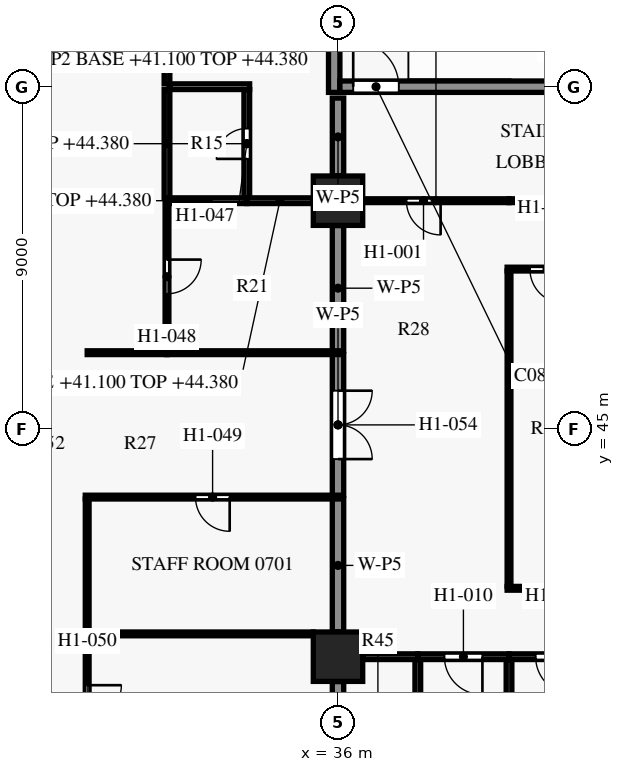
"""IFC4 building model, lengths in metres.
Left out: names, types, materials, properties, quantities, classifications, styles, units other than length and angle.
Written with IfcOpenShell. Run it as: python <this file> out.ifc"""

import sys

from ifc_helpers import new_model, si_unit, direction, frame, frame_2d, origin, origin_2d, place, context, subcontext, project, spatial, rectangle, extrude, element, fill, save


model = new_model("IFC4")
c1 = context("Model", 3, precision=1e-05, world=origin(), true_north=direction((0.0, 1.0)))
c2 = subcontext(c1, "Body", "Model", "MODEL_VIEW")
j1 = project(units=[si_unit("LENGTHUNIT", "METRE"), si_unit("PLANEANGLEUNIT", "RADIAN")], contexts=[c1])
p1 = place(None, origin())
s1 = spatial("IfcSite", under=j1, at=p1, CompositionType="ELEMENT")
p2 = place(p1, origin())
s2 = spatial("IfcBuilding", under=s1, at=p2, CompositionType="ELEMENT")
p3 = place(p2, frame((0.0, 0.0, 41.1)))
s3 = spatial("IfcBuildingStorey", under=s2, at=p3, CompositionType="ELEMENT", Elevation=41.1)
for number, where, z_axis, x_axis in (
    (1, (36.0, 39.0, 0.0), (0.0, 0.0, 1.0), (1.0, 0.0, 0.0)),
    (2, (36.0, 51.0, 0.0), (0.0, 0.0, 1.0), (1.0, 0.0, 0.0)),
):
    element("IfcColumn", number, at=place(p3, frame(where, z_axis=z_axis, x_axis=x_axis)), inside=s3, PredefinedType="COLUMN", context=c2, shape_type="SweptSolid", body=[
        extrude(rectangle(XDim=1.3, YDim=1.3, at=origin_2d()), origin(), (0.0, 0.0, 1.0), 3.6),
    ])
p4 = place(p3, frame((36.05, 54.0, 0.0), z_axis=(0.0, 0.0, 1.0), x_axis=(1.0, 0.0, 0.0)))
e3 = element("IfcWall", 3, at=p4, inside=s3, PredefinedType="SHEAR", context=c2, shape_type="SweptSolid", body=[
    extrude(rectangle(XDim=7.7, YDim=0.3, at=frame_2d((3.85, 0.0))), origin(), (0.0, 0.0, 1.0), 3.3),
])
p5 = place(p4, frame((0.35, 0.0, 0.0)))
e4 = element("IfcOpeningElement", 4, at=p5, cuts=e3, PredefinedType="OPENING", context=c2, shape_type="SweptSolid", body=[
    extrude(rectangle(XDim=1.2, YDim=2.2, at=frame_2d((0.6, 1.1))), frame((0.0, 0.16, 0.0), z_axis=(0.0, -1.0, 0.0), x_axis=(1.0, 0.0, 0.0)), (0.0, 0.0, 1.0), 0.32),
])
p6 = place(p3, frame((35.9, 53.85, 0.0), z_axis=(0.0, 0.0, 1.0), x_axis=(0.0, 1.0, 0.0)))
e5 = element("IfcWall", 5, at=p6, inside=s3, PredefinedType="SHEAR", context=c2, shape_type="SweptSolid", body=[
    extrude(rectangle(XDim=3.9, YDim=0.3, at=frame_2d((1.95, 0.0))), origin(), (0.0, 0.0, 1.0), 3.3),
])
p7 = place(p3, frame((38.1, 36.075, 0.0), z_axis=(0.0, 0.0, 1.0), x_axis=(0.0, 1.0, 0.0)))
e6 = element("IfcWall", 6, at=p7, inside=s3, PredefinedType="PARTITIONING", context=c2, shape_type="SweptSolid", body=[
    extrude(rectangle(XDim=2.85, YDim=0.15, at=frame_2d((1.425, 0.0))), origin(), (0.0, 0.0, 1.0), 2.58),
])
p8 = place(p7, frame((1.025, 0.0, 0.0)))
e7 = element("IfcOpeningElement", 7, at=p8, cuts=e6, PredefinedType="OPENING", context=c2, shape_type="SweptSolid", body=[
    extrude(rectangle(XDim=0.8, YDim=2.1, at=frame_2d((0.4, 1.05))), frame((0.0, 0.085, 0.0), z_axis=(0.0, -1.0, 0.0), x_axis=(1.0, 0.0, 0.0)), (0.0, 0.0, 1.0), 0.17),
])
p9 = place(p3, frame((36.0, 38.345, 0.0), z_axis=(0.0, 0.0, 1.0), x_axis=(0.0, -1.0, 0.0)))
e8 = element("IfcWall", 8, at=p9, inside=s3, PredefinedType="PARTITIONING", context=c2, shape_type="SweptSolid", body=[
    extrude(rectangle(XDim=2.27, YDim=0.3, at=frame_2d((1.135, 0.0))), origin(), (0.0, 0.0, 1.0), 2.58),
])
p10 = place(p3, frame((40.5, 38.925, 0.0), z_axis=(0.0, 0.0, 1.0), x_axis=(0.0, -1.0, 0.0)))
e9 = element("IfcWall", 9, at=p10, inside=s3, PredefinedType="PARTITIONING", context=c2, shape_type="SweptSolid", body=[
    extrude(rectangle(XDim=11.35, YDim=0.15, at=frame_2d((5.675, 0.0))), origin(), (0.0, 0.0, 1.0), 2.58),
])
p11 = place(p3, frame((38.1, 39.0, 0.0), z_axis=(0.0, 0.0, 1.0), x_axis=(-1.0, 0.0, 0.0)))
e10 = element("IfcWall", 10, at=p11, inside=s3, PredefinedType="PARTITIONING", context=c2, shape_type="SweptSolid", body=[
    extrude(rectangle(XDim=1.445, YDim=0.15, at=frame_2d((0.723, 0.0))), origin(), (0.0, 0.0, 1.0), 2.58),
])
p12 = place(p3, frame((40.5, 39.0, 0.0), z_axis=(0.0, 0.0, 1.0), x_axis=(-1.0, 0.0, 0.0)))
e11 = element("IfcWall", 11, at=p12, inside=s3, PredefinedType="PARTITIONING", context=c2, shape_type="SweptSolid", body=[
    extrude(rectangle(XDim=2.4, YDim=0.15, at=frame_2d((1.2, 0.0))), origin(), (0.0, 0.0, 1.0), 2.58),
])
p13 = place(p12, frame((0.7, 0.0, 0.0)))
e12 = element("IfcOpeningElement", 12, at=p13, cuts=e11, PredefinedType="OPENING", context=c2, shape_type="SweptSolid", body=[
    extrude(rectangle(XDim=1.0, YDim=2.1, at=frame_2d((0.5, 1.05))), frame((0.0, 0.085, 0.0), z_axis=(0.0, -1.0, 0.0), x_axis=(1.0, 0.0, 0.0)), (0.0, 0.0, 1.0), 0.17),
])
p14 = place(p3, frame((42.9, 39.0, 0.0), z_axis=(0.0, 0.0, 1.0), x_axis=(-1.0, 0.0, 0.0)))
e13 = element("IfcWall", 13, at=p14, inside=s3, PredefinedType="PARTITIONING", context=c2, shape_type="SweptSolid", body=[
    extrude(rectangle(XDim=2.4, YDim=0.15, at=frame_2d((1.2, 0.0))), origin(), (0.0, 0.0, 1.0), 2.58),
])
p15 = place(p14, frame((0.7, 0.0, 0.0)))
e14 = element("IfcOpeningElement", 14, at=p15, cuts=e13, PredefinedType="OPENING", context=c2, shape_type="SweptSolid", body=[
    extrude(rectangle(XDim=1.0, YDim=2.1, at=frame_2d((0.5, 1.05))), frame((0.0, 0.085, 0.0), z_axis=(0.0, -1.0, 0.0), x_axis=(1.0, 0.0, 0.0)), (0.0, 0.0, 1.0), 0.17),
])
p16 = place(p3, frame((29.4, 39.55, 0.0), z_axis=(0.0, 0.0, 1.0), x_axis=(0.0, -1.0, 0.0)))
e15 = element("IfcWall", 15, at=p16, inside=s3, PredefinedType="PARTITIONING", context=c2, shape_type="SweptSolid", body=[
    extrude(rectangle(XDim=3.5, YDim=0.1, at=frame_2d((1.75, 0.0))), origin(), (0.0, 0.0, 1.0), 3.28),
])
p17 = place(p16, frame((1.3, 0.0, 0.0)))
e16 = element("IfcOpeningElement", 16, at=p17, cuts=e15, PredefinedType="OPENING", context=c2, shape_type="SweptSolid", body=[
    extrude(rectangle(XDim=0.9, YDim=2.1, at=frame_2d((0.45, 1.05))), frame((0.0, 0.06, 0.0), z_axis=(0.0, -1.0, 0.0), x_axis=(1.0, 0.0, 0.0)), (0.0, 0.0, 1.0), 0.12),
])
p18 = place(p3, frame((35.345, 39.6, 0.0), z_axis=(0.0, 0.0, 1.0), x_axis=(-1.0, 0.0, 0.0)))
e17 = element("IfcWall", 17, at=p18, inside=s3, PredefinedType="PARTITIONING", context=c2, shape_type="SweptSolid", body=[
    extrude(rectangle(XDim=5.895, YDim=0.1, at=frame_2d((2.948, 0.0))), origin(), (0.0, 0.0, 1.0), 3.28),
])
p19 = place(p3, frame((40.45, 40.8, 0.0), z_axis=(0.0, 0.0, 1.0), x_axis=(1.0, 0.0, 0.0)))
e18 = element("IfcWall", 18, at=p19, inside=s3, PredefinedType="PARTITIONING", context=c2, shape_type="SweptSolid", body=[
    extrude(rectangle(XDim=2.1, YDim=0.1, at=frame_2d((1.05, 0.0))), origin(), (0.0, 0.0, 1.0), 3.28),
])
p20 = place(p3, frame((29.4, 43.15, 0.0), z_axis=(0.0, 0.0, 1.0), x_axis=(0.0, -1.0, 0.0)))
e19 = element("IfcWall", 19, at=p20, inside=s3, PredefinedType="PARTITIONING", context=c2, shape_type="SweptSolid", body=[
    extrude(rectangle(XDim=3.5, YDim=0.1, at=frame_2d((1.75, 0.0))), origin(), (0.0, 0.0, 1.0), 3.28),
])
p21 = place(p3, frame((36.0, 43.15, 0.0), z_axis=(0.0, 0.0, 1.0), x_axis=(0.0, -1.0, 0.0)))
e20 = element("IfcWall", 20, at=p21, inside=s3, PredefinedType="PARTITIONING", context=c2, shape_type="SweptSolid", body=[
    extrude(rectangle(XDim=3.495, YDim=0.3, at=frame_2d((1.748, 0.0))), origin(), (0.0, 0.0, 1.0), 2.58),
])
p22 = place(p3, frame((35.85, 43.2, 0.0), z_axis=(0.0, 0.0, 1.0), x_axis=(-1.0, 0.0, 0.0)))
e21 = element("IfcWall", 21, at=p22, inside=s3, PredefinedType="PARTITIONING", context=c2, shape_type="SweptSolid", body=[
    extrude(rectangle(XDim=6.5, YDim=0.1, at=frame_2d((3.25, 0.0))), origin(), (0.0, 0.0, 1.0), 3.28),
])
p23 = place(p22, frame((2.7, 0.0, 0.0)))
e22 = element("IfcOpeningElement", 22, at=p23, cuts=e21, PredefinedType="OPENING", context=c2, shape_type="SweptSolid", body=[
    extrude(rectangle(XDim=0.9, YDim=2.1, at=frame_2d((0.45, 1.05))), frame((0.0, 0.06, 0.0), z_axis=(0.0, -1.0, 0.0), x_axis=(1.0, 0.0, 0.0)), (0.0, 0.0, 1.0), 0.12),
])
p24 = place(p3, frame((36.0, 46.95, 0.0), z_axis=(0.0, 0.0, 1.0), x_axis=(0.0, -1.0, 0.0)))
e23 = element("IfcWall", 23, at=p24, inside=s3, PredefinedType="PARTITIONING", context=c2, shape_type="SweptSolid", body=[
    extrude(rectangle(XDim=3.7, YDim=0.3, at=frame_2d((1.85, 0.0))), origin(), (0.0, 0.0, 1.0), 2.58),
])
p25 = place(p24, frame((0.95, 0.0, 0.0)))
e24 = element("IfcOpeningElement", 24, at=p25, cuts=e23, PredefinedType="OPENING", context=c2, shape_type="SweptSolid", body=[
    extrude(rectangle(XDim=1.8, YDim=2.1, at=frame_2d((0.9, 1.05))), frame((0.0, 0.16, 0.0), z_axis=(0.0, -1.0, 0.0), x_axis=(1.0, 0.0, 0.0)), (0.0, 0.0, 1.0), 0.32),
])
p26 = place(p3, frame((29.4, 47.0, 0.0), z_axis=(0.0, 0.0, 1.0), x_axis=(1.0, 0.0, 0.0)))
e25 = element("IfcWall", 25, at=p26, inside=s3, PredefinedType="PARTITIONING", context=c2, shape_type="SweptSolid", body=[
    extrude(rectangle(XDim=2.1, YDim=0.1, at=frame_2d((1.05, 0.0))), origin(), (0.0, 0.0, 1.0), 3.28),
])
p27 = place(p3, frame((31.5, 47.0, 0.0), z_axis=(0.0, 0.0, 1.0), x_axis=(1.0, 0.0, 0.0)))
e26 = element("IfcWall", 26, at=p27, inside=s3, PredefinedType="PARTITIONING", context=c2, shape_type="SweptSolid", body=[
    extrude(rectangle(XDim=4.35, YDim=0.1, at=frame_2d((2.175, 0.0))), origin(), (0.0, 0.0, 1.0), 3.28),
])
p28 = place(p3, frame((40.5, 49.15, 0.0), z_axis=(0.0, 0.0, 1.0), x_axis=(0.0, -1.0, 0.0)))
e27 = element("IfcWall", 27, at=p28, inside=s3, PredefinedType="PARTITIONING", context=c2, shape_type="SweptSolid", body=[
    extrude(rectangle(XDim=8.3, YDim=0.1, at=frame_2d((4.15, 0.0))), origin(), (0.0, 0.0, 1.0), 3.28),
])
p29 = place(p3, frame((42.55, 49.2, 0.0), z_axis=(0.0, 0.0, 1.0), x_axis=(-1.0, 0.0, 0.0)))
e28 = element("IfcWall", 28, at=p29, inside=s3, PredefinedType="PARTITIONING", context=c2, shape_type="SweptSolid", body=[
    extrude(rectangle(XDim=2.1, YDim=0.1, at=frame_2d((1.05, 0.0))), origin(), (0.0, 0.0, 1.0), 3.28),
])
p30 = place(p29, frame((0.6, 0.0, 0.0)))
e29 = element("IfcOpeningElement", 29, at=p30, cuts=e28, PredefinedType="OPENING", context=c2, shape_type="SweptSolid", body=[
    extrude(rectangle(XDim=0.9, YDim=2.1, at=frame_2d((0.45, 1.05))), frame((0.0, 0.06, 0.0), z_axis=(0.0, -1.0, 0.0), x_axis=(1.0, 0.0, 0.0)), (0.0, 0.0, 1.0), 0.12),
])
p31 = place(p3, frame((36.0, 50.345, 0.0), z_axis=(0.0, 0.0, 1.0), x_axis=(0.0, -1.0, 0.0)))
e30 = element("IfcWall", 30, at=p31, inside=s3, PredefinedType="PARTITIONING", context=c2, shape_type="SweptSolid", body=[
    extrude(rectangle(XDim=3.295, YDim=0.3, at=frame_2d((1.647, 0.0))), origin(), (0.0, 0.0, 1.0), 2.58),
])
p32 = place(p3, frame((31.5, 50.925, 0.0), z_axis=(0.0, 0.0, 1.0), x_axis=(0.0, -1.0, 0.0)))
e31 = element("IfcWall", 31, at=p32, inside=s3, PredefinedType="PARTITIONING", context=c2, shape_type="SweptSolid", body=[
    extrude(rectangle(XDim=3.875, YDim=0.1, at=frame_2d((1.938, 0.0))), origin(), (0.0, 0.0, 1.0), 3.28),
])
p33 = place(p32, frame((1.475, 0.0, 0.0)))
e32 = element("IfcOpeningElement", 32, at=p33, cuts=e31, PredefinedType="OPENING", context=c2, shape_type="SweptSolid", body=[
    extrude(rectangle(XDim=0.9, YDim=2.1, at=frame_2d((0.45, 1.05))), frame((0.0, 0.06, 0.0), z_axis=(0.0, -1.0, 0.0), x_axis=(1.0, 0.0, 0.0)), (0.0, 0.0, 1.0), 0.12),
])
p34 = place(p3, frame((31.575, 51.0, 0.0), z_axis=(0.0, 0.0, 1.0), x_axis=(1.0, 0.0, 0.0)))
e33 = element("IfcWall", 33, at=p34, inside=s3, PredefinedType="PARTITIONING", context=c2, shape_type="SweptSolid", body=[
    extrude(rectangle(XDim=2.025, YDim=0.15, at=frame_2d((1.013, 0.0))), origin(), (0.0, 0.0, 1.0), 3.28),
])
p35 = place(p3, frame((33.6, 51.0, 0.0), z_axis=(0.0, 0.0, 1.0), x_axis=(1.0, 0.0, 0.0)))
e34 = element("IfcWall", 34, at=p35, inside=s3, PredefinedType="PARTITIONING", context=c2, shape_type="SweptSolid", body=[
    extrude(rectangle(XDim=1.745, YDim=0.15, at=frame_2d((0.873, 0.0))), origin(), (0.0, 0.0, 1.0), 3.28),
])
p36 = place(p3, frame((40.5, 51.0, 0.0), z_axis=(0.0, 0.0, 1.0), x_axis=(-1.0, 0.0, 0.0)))
e35 = element("IfcWall", 35, at=p36, inside=s3, PredefinedType="PARTITIONING", context=c2, shape_type="SweptSolid", body=[
    extrude(rectangle(XDim=3.845, YDim=0.1, at=frame_2d((1.922, 0.0))), origin(), (0.0, 0.0, 1.0), 2.58),
])
p37 = place(p36, frame((1.8, 0.0, 0.0)))
e36 = element("IfcOpeningElement", 36, at=p37, cuts=e35, PredefinedType="OPENING", context=c2, shape_type="SweptSolid", body=[
    extrude(rectangle(XDim=0.9, YDim=2.1, at=frame_2d((0.45, 1.05))), frame((0.0, 0.06, 0.0), z_axis=(0.0, -1.0, 0.0), x_axis=(1.0, 0.0, 0.0)), (0.0, 0.0, 1.0), 0.12),
])
p38 = place(p3, frame((44.33, 51.0, 0.0), z_axis=(0.0, 0.0, 1.0), x_axis=(-1.0, 0.0, 0.0)))
e37 = element("IfcWall", 37, at=p38, inside=s3, PredefinedType="PARTITIONING", context=c2, shape_type="SweptSolid", body=[
    extrude(rectangle(XDim=3.83, YDim=0.1, at=frame_2d((1.915, 0.0))), origin(), (0.0, 0.0, 1.0), 2.58),
])
p39 = place(p3, frame((33.6, 51.075, 0.0), z_axis=(0.0, 0.0, 1.0), x_axis=(0.0, 1.0, 0.0)))
e38 = element("IfcWall", 38, at=p39, inside=s3, PredefinedType="PARTITIONING", context=c2, shape_type="SweptSolid", body=[
    extrude(rectangle(XDim=2.85, YDim=0.15, at=frame_2d((1.425, 0.0))), origin(), (0.0, 0.0, 1.0), 3.28),
])
p40 = place(p39, frame((1.025, 0.0, 0.0)))
e39 = element("IfcOpeningElement", 39, at=p40, cuts=e38, PredefinedType="OPENING", context=c2, shape_type="SweptSolid", body=[
    extrude(rectangle(XDim=0.8, YDim=2.1, at=frame_2d((0.4, 1.05))), frame((0.0, 0.085, 0.0), z_axis=(0.0, -1.0, 0.0), x_axis=(1.0, 0.0, 0.0)), (0.0, 0.0, 1.0), 0.17),
])
p41 = place(p3, frame((36.0, 53.7, 0.0), z_axis=(0.0, 0.0, 1.0), x_axis=(0.0, -1.0, 0.0)))
e40 = element("IfcWall", 40, at=p41, inside=s3, PredefinedType="PARTITIONING", context=c2, shape_type="SweptSolid", body=[
    extrude(rectangle(XDim=2.045, YDim=0.3, at=frame_2d((1.022, 0.0))), origin(), (0.0, 0.0, 1.0), 2.58),
])
p42 = place(p3, frame((31.5, 53.925, 0.0), z_axis=(0.0, 0.0, 1.0), x_axis=(0.0, -1.0, 0.0)))
e41 = element("IfcWall", 41, at=p42, inside=s3, PredefinedType="PARTITIONING", context=c2, shape_type="SweptSolid", body=[
    extrude(rectangle(XDim=2.85, YDim=0.15, at=frame_2d((1.425, 0.0))), origin(), (0.0, 0.0, 1.0), 3.28),
])
p43 = place(p3, frame((33.675, 54.0, 0.0), z_axis=(0.0, 0.0, 1.0), x_axis=(-1.0, 0.0, 0.0)))
e42 = element("IfcWall", 42, at=p43, inside=s3, PredefinedType="PARTITIONING", context=c2, shape_type="SweptSolid", body=[
    extrude(rectangle(XDim=2.1, YDim=0.15, at=frame_2d((1.05, 0.0))), origin(), (0.0, 0.0, 1.0), 3.28),
])
p44 = place(p3, frame((31.5, 62.425, 0.0), z_axis=(0.0, 0.0, 1.0), x_axis=(0.0, -1.0, 0.0)))
e43 = element("IfcWall", 43, at=p44, inside=s3, PredefinedType="PARTITIONING", context=c2, shape_type="SweptSolid", body=[
    extrude(rectangle(XDim=8.35, YDim=0.15, at=frame_2d((4.175, 0.0))), origin(), (0.0, 0.0, 1.0), 3.28),
])
p45 = place(p44, frame((3.925, 0.0, 0.0)))
e44 = element("IfcOpeningElement", 44, at=p45, cuts=e43, PredefinedType="OPENING", context=c2, shape_type="SweptSolid", body=[
    extrude(rectangle(XDim=1.0, YDim=2.1, at=frame_2d((0.5, 1.05))), frame((0.0, 0.085, 0.0), z_axis=(0.0, -1.0, 0.0), x_axis=(1.0, 0.0, 0.0)), (0.0, 0.0, 1.0), 0.17),
])
p46 = place(p5, origin())
e45 = element("IfcDoor", 45, at=p46, inside=s3, OperationType="SINGLE_SWING_LEFT", PredefinedType="DOOR", context=c2, shape_type="SweptSolid", body=[
    extrude(rectangle(XDim=1.2, YDim=2.2, at=frame_2d((0.6, 1.1))), frame((0.0, 0.025, 0.0), z_axis=(0.0, -1.0, 0.0), x_axis=(1.0, 0.0, 0.0)), (0.0, 0.0, 1.0), 0.05),
])
fill(e4, e45)
p47 = place(p37, origin())
e46 = element("IfcDoor", 46, at=p47, inside=s3, OperationType="SINGLE_SWING_LEFT", PredefinedType="DOOR", context=c2, shape_type="SweptSolid", body=[
    extrude(rectangle(XDim=0.9, YDim=2.1, at=frame_2d((0.45, 1.05))), frame((0.0, 0.025, 0.0), z_axis=(0.0, -1.0, 0.0), x_axis=(1.0, 0.0, 0.0)), (0.0, 0.0, 1.0), 0.05),
])
fill(e36, e46)
p48 = place(p13, origin())
e47 = element("IfcDoor", 47, at=p48, inside=s3, OperationType="SINGLE_SWING_LEFT", PredefinedType="DOOR", context=c2, shape_type="SweptSolid", body=[
    extrude(rectangle(XDim=1.0, YDim=2.1, at=frame_2d((0.5, 1.05))), frame((0.0, 0.025, 0.0), z_axis=(0.0, -1.0, 0.0), x_axis=(1.0, 0.0, 0.0)), (0.0, 0.0, 1.0), 0.05),
])
fill(e12, e47)
p49 = place(p15, origin())
e48 = element("IfcDoor", 48, at=p49, inside=s3, OperationType="SINGLE_SWING_LEFT", PredefinedType="DOOR", context=c2, shape_type="SweptSolid", body=[
    extrude(rectangle(XDim=1.0, YDim=2.1, at=frame_2d((0.5, 1.05))), frame((0.0, 0.025, 0.0), z_axis=(0.0, -1.0, 0.0), x_axis=(1.0, 0.0, 0.0)), (0.0, 0.0, 1.0), 0.05),
])
fill(e14, e48)
p50 = place(p30, origin())
e49 = element("IfcDoor", 49, at=p50, inside=s3, OperationType="SINGLE_SWING_LEFT", PredefinedType="DOOR", context=c2, shape_type="SweptSolid", body=[
    extrude(rectangle(XDim=0.9, YDim=2.1, at=frame_2d((0.45, 1.05))), frame((0.0, 0.025, 0.0), z_axis=(0.0, -1.0, 0.0), x_axis=(1.0, 0.0, 0.0)), (0.0, 0.0, 1.0), 0.05),
])
fill(e29, e49)
p51 = place(p40, origin())
e50 = element("IfcDoor", 50, at=p51, inside=s3, OperationType="SINGLE_SWING_LEFT", PredefinedType="DOOR", context=c2, shape_type="SweptSolid", body=[
    extrude(rectangle(XDim=0.8, YDim=2.1, at=frame_2d((0.4, 1.05))), frame((0.0, 0.025, 0.0), z_axis=(0.0, -1.0, 0.0), x_axis=(1.0, 0.0, 0.0)), (0.0, 0.0, 1.0), 0.05),
])
fill(e39, e50)
p52 = place(p33, origin())
e51 = element("IfcDoor", 51, at=p52, inside=s3, OperationType="SINGLE_SWING_LEFT", PredefinedType="DOOR", context=c2, shape_type="SweptSolid", body=[
    extrude(rectangle(XDim=0.9, YDim=2.1, at=frame_2d((0.45, 1.05))), frame((0.0, 0.025, 0.0), z_axis=(0.0, -1.0, 0.0), x_axis=(1.0, 0.0, 0.0)), (0.0, 0.0, 1.0), 0.05),
])
fill(e32, e51)
p53 = place(p23, origin())
e52 = element("IfcDoor", 52, at=p53, inside=s3, OperationType="SINGLE_SWING_LEFT", PredefinedType="DOOR", context=c2, shape_type="SweptSolid", body=[
    extrude(rectangle(XDim=0.9, YDim=2.1, at=frame_2d((0.45, 1.05))), frame((0.0, 0.025, 0.0), z_axis=(0.0, -1.0, 0.0), x_axis=(1.0, 0.0, 0.0)), (0.0, 0.0, 1.0), 0.05),
])
fill(e22, e52)
p54 = place(p17, origin())
e53 = element("IfcDoor", 53, at=p54, inside=s3, OperationType="SINGLE_SWING_RIGHT", PredefinedType="DOOR", context=c2, shape_type="SweptSolid", body=[
    extrude(rectangle(XDim=0.9, YDim=2.1, at=frame_2d((0.45, 1.05))), frame((0.0, 0.025, 0.0), z_axis=(0.0, -1.0, 0.0), x_axis=(1.0, 0.0, 0.0)), (0.0, 0.0, 1.0), 0.05),
])
fill(e16, e53)
p55 = place(p25, origin())
e54 = element("IfcDoor", 54, at=p55, inside=s3, OperationType="DOUBLE_DOOR_SINGLE_SWING", PredefinedType="DOOR", context=c2, shape_type="SweptSolid", body=[
    extrude(rectangle(XDim=1.8, YDim=2.1, at=frame_2d((0.9, 1.05))), frame((0.0, 0.025, 0.0), z_axis=(0.0, -1.0, 0.0), x_axis=(1.0, 0.0, 0.0)), (0.0, 0.0, 1.0), 0.05),
])
fill(e24, e54)
save(model, sys.argv[1])
